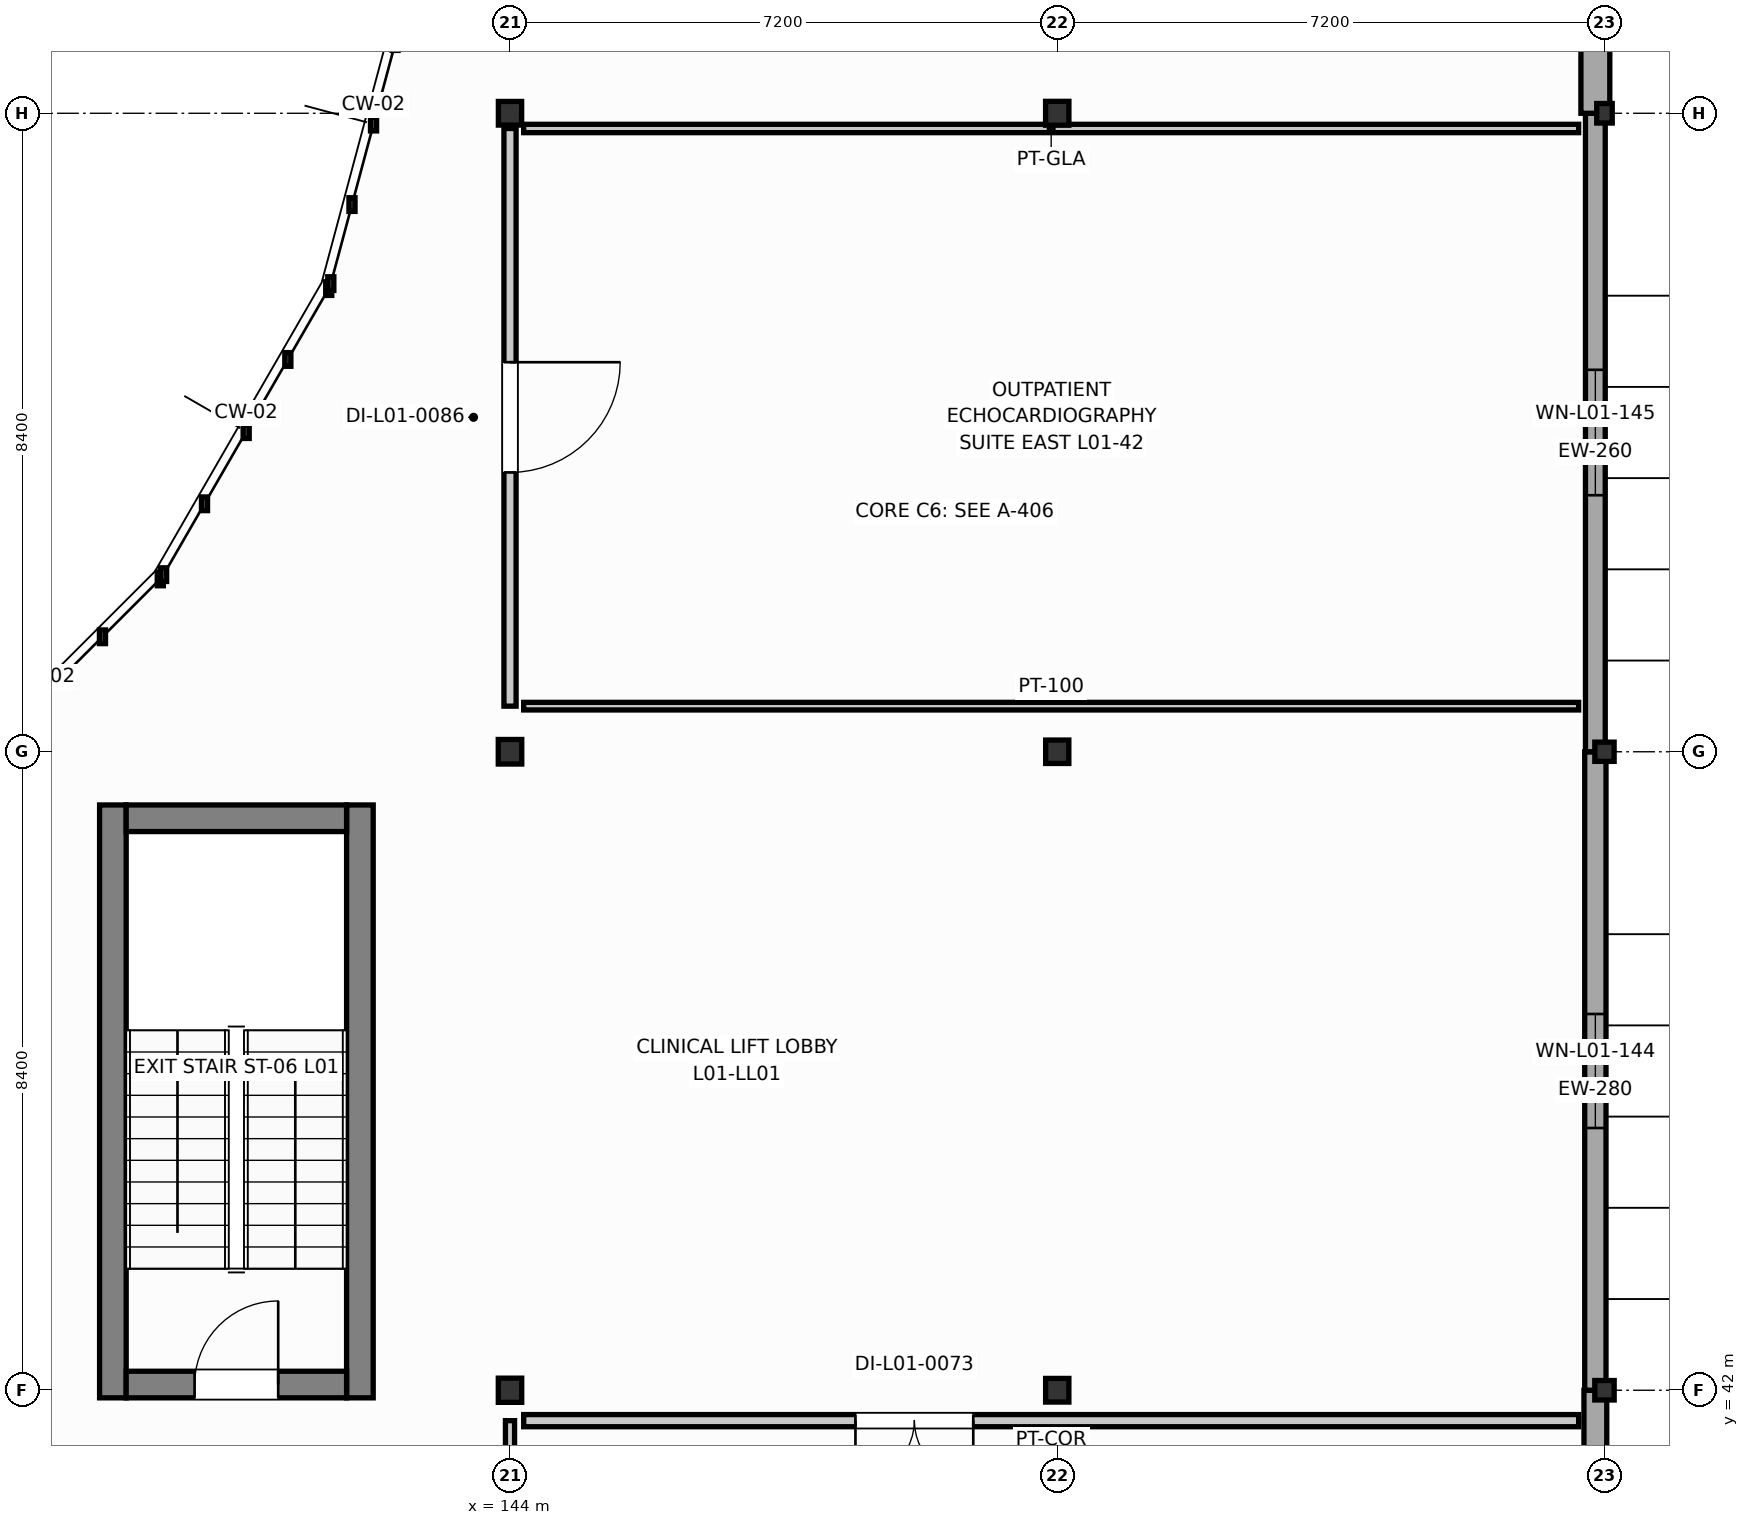
"""IFC4 building model, lengths in metres.
Left out: names, types, materials, properties, quantities, classifications, styles, units other than length and angle.
Written with IfcOpenShell. Run it as: python <this file> out.ifc"""

import sys

from ifc_helpers import new_model, si_unit, direction, frame, frame_2d, origin, origin_2d, place, context, subcontext, project, spatial, rectangle, i_section, extrude, element, fill, save


model = new_model("IFC4")
c1 = context("Model", 3, precision=1e-05, world=origin(), true_north=direction((0.0, 1.0)))
c2 = subcontext(c1, "Body", "Model", "MODEL_VIEW")
j1 = project(units=[si_unit("LENGTHUNIT", "METRE"), si_unit("PLANEANGLEUNIT", "RADIAN")], contexts=[c1])
p1 = place(None, origin())
s1 = spatial("IfcSite", under=j1, at=p1, CompositionType="ELEMENT")
p2 = place(p1, origin())
s2 = spatial("IfcBuilding", under=s1, at=p2, CompositionType="ELEMENT")
p3 = place(p2, frame((0.0, 0.0, 4.8)))
s3 = spatial("IfcBuildingStorey", under=s2, at=p3, CompositionType="ELEMENT", Elevation=4.8)
p4 = place(p3, frame((144.0, 42.0, 0.0), z_axis=(0.0, 0.0, 1.0), x_axis=(1.0, 0.0, 0.0)))
e1 = element("IfcColumn", 1, at=p4, inside=s3, PredefinedType="COLUMN", context=c2, shape_type="SweptSolid", body=[
    extrude(i_section(OverallWidth=0.308, OverallDepth=0.318, WebThickness=0.013, FlangeThickness=0.021, FilletRadius=0.016, at=origin_2d()), origin(), (0.0, 0.0, 1.0), 4.2),
])
p5 = place(p3, frame((144.0, 50.4, 0.0), z_axis=(0.0, 0.0, 1.0), x_axis=(1.0, 0.0, 0.0)))
e2 = element("IfcColumn", 2, at=p5, inside=s3, PredefinedType="COLUMN", context=c2, shape_type="SweptSolid", body=[
    extrude(i_section(OverallWidth=0.309, OverallDepth=0.323, WebThickness=0.014, FlangeThickness=0.023, FilletRadius=0.016, at=origin_2d()), origin(), (0.0, 0.0, 1.0), 4.2),
])
for number, where, z_axis, x_axis in (
    (3, (144.0, 58.8, 0.0), (0.0, 0.0, 1.0), (1.0, 0.0, 0.0)),
    (4, (151.2, 42.0, 0.0), (0.0, 0.0, 1.0), (1.0, 0.0, 0.0)),
):
    element("IfcColumn", number, at=place(p3, frame(where, z_axis=z_axis, x_axis=x_axis)), inside=s3, PredefinedType="COLUMN", context=c2, shape_type="SweptSolid", body=[
        extrude(i_section(OverallWidth=0.306, OverallDepth=0.311, WebThickness=0.011, FlangeThickness=0.017, FilletRadius=0.015, at=origin_2d()), origin(), (0.0, 0.0, 1.0), 4.2),
    ])
p6 = place(p3, frame((151.2, 50.4, 0.0), z_axis=(0.0, 0.0, 1.0), x_axis=(1.0, 0.0, 0.0)))
e5 = element("IfcColumn", 5, at=p6, inside=s3, PredefinedType="COLUMN", context=c2, shape_type="SweptSolid", body=[
    extrude(i_section(OverallWidth=0.305, OverallDepth=0.308, WebThickness=0.01, FlangeThickness=0.015, FilletRadius=0.015, at=origin_2d()), origin(), (0.0, 0.0, 1.0), 4.2),
])
p7 = place(p3, frame((151.2, 58.8, 0.0), z_axis=(0.0, 0.0, 1.0), x_axis=(1.0, 0.0, 0.0)))
e6 = element("IfcColumn", 6, at=p7, inside=s3, PredefinedType="COLUMN", context=c2, shape_type="SweptSolid", body=[
    extrude(i_section(OverallWidth=0.307, OverallDepth=0.314, WebThickness=0.012, FlangeThickness=0.019, FilletRadius=0.016, at=origin_2d()), origin(), (0.0, 0.0, 1.0), 4.2),
])
p8 = place(p3, frame((158.4, 42.0, 0.0), z_axis=(0.0, 0.0, 1.0), x_axis=(1.0, 0.0, 0.0)))
e7 = element("IfcColumn", 7, at=p8, inside=s3, PredefinedType="COLUMN", context=c2, shape_type="SweptSolid", body=[
    extrude(i_section(OverallWidth=0.255, OverallDepth=0.256, WebThickness=0.01, FlangeThickness=0.016, FilletRadius=0.013, at=origin_2d()), origin(), (0.0, 0.0, 1.0), 4.2),
])
p9 = place(p3, frame((158.4, 50.4, 0.0), z_axis=(0.0, 0.0, 1.0), x_axis=(1.0, 0.0, 0.0)))
e8 = element("IfcColumn", 8, at=p9, inside=s3, PredefinedType="COLUMN", context=c2, shape_type="SweptSolid", body=[
    extrude(i_section(OverallWidth=0.254, OverallDepth=0.253, WebThickness=0.009, FlangeThickness=0.014, FilletRadius=0.013, at=origin_2d()), origin(), (0.0, 0.0, 1.0), 4.2),
])
p10 = place(p3, frame((158.4, 58.8, 0.0), z_axis=(0.0, 0.0, 1.0), x_axis=(1.0, 0.0, 0.0)))
e9 = element("IfcColumn", 9, at=p10, inside=s3, PredefinedType="COLUMN", context=c2, shape_type="SweptSolid", body=[
    extrude(i_section(OverallWidth=0.204, OverallDepth=0.257, WebThickness=0.009, FlangeThickness=0.016, FilletRadius=0.013, at=origin_2d()), origin(), (0.0, 0.0, 1.0), 4.2),
])
for number, where, z_axis, x_axis in (
    (10, (138.775, 41.9, 0.0), (0.0, 0.0, 1.0), (0.0, 1.0, 0.0)),
    (11, (142.025, 41.9, 0.0), (0.0, 0.0, 1.0), (0.0, 1.0, 0.0)),
):
    element("IfcWall", number, at=place(p3, frame(where, z_axis=z_axis, x_axis=x_axis)), inside=s3, PredefinedType="SHEAR", context=c2, shape_type="SweptSolid", body=[
        extrude(rectangle(XDim=7.8, YDim=0.35, at=frame_2d((3.9, 0.0))), origin(), (0.0, 0.0, 1.0), 3.98),
    ])
p11 = place(p3, frame((138.95, 49.525, 0.0), z_axis=(0.0, 0.0, 1.0), x_axis=(1.0, 0.0, 0.0)))
e12 = element("IfcWall", 12, at=p11, inside=s3, PredefinedType="SHEAR", context=c2, shape_type="SweptSolid", body=[
    extrude(rectangle(XDim=2.9, YDim=0.35, at=frame_2d((1.45, 0.0))), origin(), (0.0, 0.0, 1.0), 3.98),
])
p12 = place(p3, frame((138.95, 42.075, 0.0), z_axis=(0.0, 0.0, 1.0), x_axis=(1.0, 0.0, 0.0)))
e13 = element("IfcWall", 13, at=p12, inside=s3, PredefinedType="SHEAR", context=c2, shape_type="SweptSolid", body=[
    extrude(rectangle(XDim=2.9, YDim=0.35, at=frame_2d((1.45, 0.0))), origin(), (0.0, 0.0, 1.0), 3.98),
])
p13 = place(p12, frame((0.9, 0.0, 0.0)))
e14 = element("IfcOpeningElement", 14, at=p13, cuts=e13, PredefinedType="OPENING", context=c2, shape_type="SweptSolid", body=[
    extrude(rectangle(XDim=1.1, YDim=2.15, at=frame_2d((0.55, 1.075))), frame((0.0, 0.185, 0.0), z_axis=(0.0, -1.0, 0.0), x_axis=(1.0, 0.0, 0.0)), (0.0, 0.0, 1.0), 0.37),
])
p14 = place(p3, frame((158.28, 33.6, 0.0), z_axis=(0.0, 0.0, 1.0), x_axis=(0.0, 1.0, 0.0)))
e15 = element("IfcWall", 15, at=p14, inside=s3, PredefinedType="SOLIDWALL", context=c2, shape_type="SweptSolid", body=[
    extrude(rectangle(XDim=8.4, YDim=0.3, at=frame_2d((4.2, 0.0))), origin(), (0.0, 0.0, 1.0), 3.529),
])
p15 = place(p14, frame((3.45, 0.0, 0.95)))
e16 = element("IfcOpeningElement", 16, at=p15, cuts=e15, PredefinedType="OPENING", context=c2, shape_type="SweptSolid", body=[
    extrude(rectangle(XDim=1.5, YDim=1.55, at=frame_2d((0.75, 0.775))), frame((0.0, 0.16, 0.0), z_axis=(0.0, -1.0, 0.0), x_axis=(1.0, 0.0, 0.0)), (0.0, 0.0, 1.0), 0.32),
])
p16 = place(p3, frame((158.28, 42.0, 0.0), z_axis=(0.0, 0.0, 1.0), x_axis=(0.0, 1.0, 0.0)))
e17 = element("IfcWall", 17, at=p16, inside=s3, PredefinedType="SOLIDWALL", context=c2, shape_type="SweptSolid", body=[
    extrude(rectangle(XDim=8.4, YDim=0.28, at=frame_2d((4.2, 0.0))), origin(), (0.0, 0.0, 1.0), 3.091),
])
p17 = place(p16, frame((3.45, 0.0, 0.95)))
e18 = element("IfcOpeningElement", 18, at=p17, cuts=e17, PredefinedType="OPENING", context=c2, shape_type="SweptSolid", body=[
    extrude(rectangle(XDim=1.5, YDim=1.75, at=frame_2d((0.75, 0.875))), frame((0.0, 0.15, 0.0), z_axis=(0.0, -1.0, 0.0), x_axis=(1.0, 0.0, 0.0)), (0.0, 0.0, 1.0), 0.3),
])
p18 = place(p3, frame((158.28, 50.4, 0.0), z_axis=(0.0, 0.0, 1.0), x_axis=(0.0, 1.0, 0.0)))
e19 = element("IfcWall", 19, at=p18, inside=s3, PredefinedType="SOLIDWALL", context=c2, shape_type="SweptSolid", body=[
    extrude(rectangle(XDim=8.4, YDim=0.26, at=frame_2d((4.2, 0.0))), origin(), (0.0, 0.0, 1.0), 3.091),
])
p19 = place(p18, frame((3.375, 0.0, 0.95)))
e20 = element("IfcOpeningElement", 20, at=p19, cuts=e19, PredefinedType="OPENING", context=c2, shape_type="SweptSolid", body=[
    extrude(rectangle(XDim=1.65, YDim=1.15, at=frame_2d((0.825, 0.575))), frame((0.0, 0.14, 0.0), z_axis=(0.0, -1.0, 0.0), x_axis=(1.0, 0.0, 0.0)), (0.0, 0.0, 1.0), 0.28),
])
p20 = place(p3, frame((158.28, 58.8, 0.0), z_axis=(0.0, 0.0, 1.0), x_axis=(0.0, 1.0, 0.0)))
e21 = element("IfcWall", 21, at=p20, inside=s3, PredefinedType="SOLIDWALL", context=c2, shape_type="SweptSolid", body=[
    extrude(rectangle(XDim=8.4, YDim=0.38, at=frame_2d((4.2, 0.0))), origin(), (0.0, 0.0, 1.0), 3.091),
])
p21 = place(p20, frame((3.375, 0.0, 0.95)))
e22 = element("IfcOpeningElement", 22, at=p21, cuts=e21, PredefinedType="OPENING", context=c2, shape_type="SweptSolid", body=[
    extrude(rectangle(XDim=1.65, YDim=1.35, at=frame_2d((0.825, 0.675))), frame((0.0, 0.2, 0.0), z_axis=(0.0, -1.0, 0.0), x_axis=(1.0, 0.0, 0.0)), (0.0, 0.0, 1.0), 0.4),
])
p22 = place(p3, frame((144.0, 33.94, 0.0), z_axis=(0.0, 0.0, 1.0), x_axis=(0.0, 1.0, 0.0)))
e23 = element("IfcWall", 23, at=p22, inside=s3, PredefinedType="PARTITIONING", context=c2, shape_type="SweptSolid", body=[
    extrude(rectangle(XDim=7.66, YDim=0.12, at=frame_2d((3.83, 0.0))), origin(), (0.0, 0.0, 1.0), 3.535),
])
p23 = place(p3, frame((144.18, 41.6, 0.0), z_axis=(0.0, 0.0, 1.0), x_axis=(1.0, 0.0, 0.0)))
e24 = element("IfcWall", 24, at=p23, inside=s3, PredefinedType="PARTITIONING", context=c2, shape_type="SweptSolid", body=[
    extrude(rectangle(XDim=13.88, YDim=0.16, at=frame_2d((6.94, 0.0))), origin(), (0.0, 0.0, 1.0), 3.175),
])
p24 = place(p23, frame((4.365, 0.0, 0.0)))
e25 = element("IfcOpeningElement", 25, at=p24, cuts=e24, PredefinedType="OPENING", context=c2, shape_type="SweptSolid", body=[
    extrude(rectangle(XDim=1.55, YDim=2.2, at=frame_2d((0.775, 1.1))), frame((0.0, 0.09, 0.0), z_axis=(0.0, -1.0, 0.0), x_axis=(1.0, 0.0, 0.0)), (0.0, 0.0, 1.0), 0.18),
])
p25 = place(p3, frame((144.0, 51.0, 0.0), z_axis=(0.0, 0.0, 1.0), x_axis=(0.0, 1.0, 0.0)))
e26 = element("IfcWall", 26, at=p25, inside=s3, PredefinedType="PARTITIONING", context=c2, shape_type="SweptSolid", body=[
    extrude(rectangle(XDim=7.6, YDim=0.16, at=frame_2d((3.8, 0.0))), origin(), (0.0, 0.0, 1.0), 3.175),
])
p26 = place(p25, frame((3.075, 0.0, 0.0)))
e27 = element("IfcOpeningElement", 27, at=p26, cuts=e26, PredefinedType="OPENING", context=c2, shape_type="SweptSolid", body=[
    extrude(rectangle(XDim=1.45, YDim=2.2, at=frame_2d((0.725, 1.1))), frame((0.0, 0.09, 0.0), z_axis=(0.0, -1.0, 0.0), x_axis=(1.0, 0.0, 0.0)), (0.0, 0.0, 1.0), 0.18),
])
p27 = place(p3, frame((144.18, 58.6, 0.0), z_axis=(0.0, 0.0, 1.0), x_axis=(1.0, 0.0, 0.0)))
e28 = element("IfcWall", 28, at=p27, inside=s3, PredefinedType="MOVABLE", context=c2, shape_type="SweptSolid", body=[
    extrude(rectangle(XDim=13.88, YDim=0.11, at=frame_2d((6.94, 0.0))), origin(), (0.0, 0.0, 1.0), 3.175),
])
p28 = place(p3, frame((158.06, 51.0, 0.0), z_axis=(0.0, 0.0, 1.0), x_axis=(-1.0, 0.0, 0.0)))
e29 = element("IfcWall", 29, at=p28, inside=s3, PredefinedType="PARTITIONING", context=c2, shape_type="SweptSolid", body=[
    extrude(rectangle(XDim=13.88, YDim=0.1, at=frame_2d((6.94, 0.0))), origin(), (0.0, 0.0, 1.0), 3.175),
])
p29 = place(p13, origin())
e30 = element("IfcDoor", 30, at=p29, inside=s3, OperationType="SINGLE_SWING_RIGHT", PredefinedType="DOOR", context=c2, shape_type="SweptSolid", body=[
    extrude(rectangle(XDim=1.1, YDim=2.15, at=frame_2d((0.55, 1.075))), frame((0.0, 0.025, 0.0), z_axis=(0.0, -1.0, 0.0), x_axis=(1.0, 0.0, 0.0)), (0.0, 0.0, 1.0), 0.05),
])
fill(e14, e30)
p30 = place(p17, origin())
e31 = element("IfcWindow", 31, at=p30, inside=s3, PartitioningType="SINGLE_PANEL", PredefinedType="WINDOW", context=c2, shape_type="SweptSolid", body=[
    extrude(rectangle(XDim=1.5, YDim=1.75, at=frame_2d((0.75, 0.875))), frame((0.0, 0.03, 0.0), z_axis=(0.0, -1.0, 0.0), x_axis=(1.0, 0.0, 0.0)), (0.0, 0.0, 1.0), 0.06),
])
fill(e18, e31)
p31 = place(p19, origin())
e32 = element("IfcWindow", 32, at=p31, inside=s3, PartitioningType="SINGLE_PANEL", PredefinedType="WINDOW", context=c2, shape_type="SweptSolid", body=[
    extrude(rectangle(XDim=1.65, YDim=1.15, at=frame_2d((0.825, 0.575))), frame((0.0, 0.03, 0.0), z_axis=(0.0, -1.0, 0.0), x_axis=(1.0, 0.0, 0.0)), (0.0, 0.0, 1.0), 0.06),
])
fill(e20, e32)
p32 = place(p24, frame((1.55, 0.0, 0.0), z_axis=(0.0, 0.0, 1.0), x_axis=(-1.0, 0.0, 0.0)))
e33 = element("IfcDoor", 33, at=p32, inside=s3, OperationType="DOUBLE_DOOR_SINGLE_SWING", PredefinedType="DOOR", context=c2, shape_type="SweptSolid", body=[
    extrude(rectangle(XDim=1.55, YDim=2.2, at=frame_2d((0.775, 1.1))), frame((0.0, 0.025, 0.0), z_axis=(0.0, -1.0, 0.0), x_axis=(1.0, 0.0, 0.0)), (0.0, 0.0, 1.0), 0.05),
])
fill(e25, e33)
p33 = place(p26, frame((1.45, 0.0, 0.0), z_axis=(0.0, 0.0, 1.0), x_axis=(-1.0, 0.0, 0.0)))
e34 = element("IfcDoor", 34, at=p33, inside=s3, OperationType="SINGLE_SWING_LEFT", PredefinedType="DOOR", context=c2, shape_type="SweptSolid", body=[
    extrude(rectangle(XDim=1.45, YDim=2.2, at=frame_2d((0.725, 1.1))), frame((0.0, 0.025, 0.0), z_axis=(0.0, -1.0, 0.0), x_axis=(1.0, 0.0, 0.0)), (0.0, 0.0, 1.0), 0.05),
])
fill(e27, e34)
save(model, sys.argv[1])
